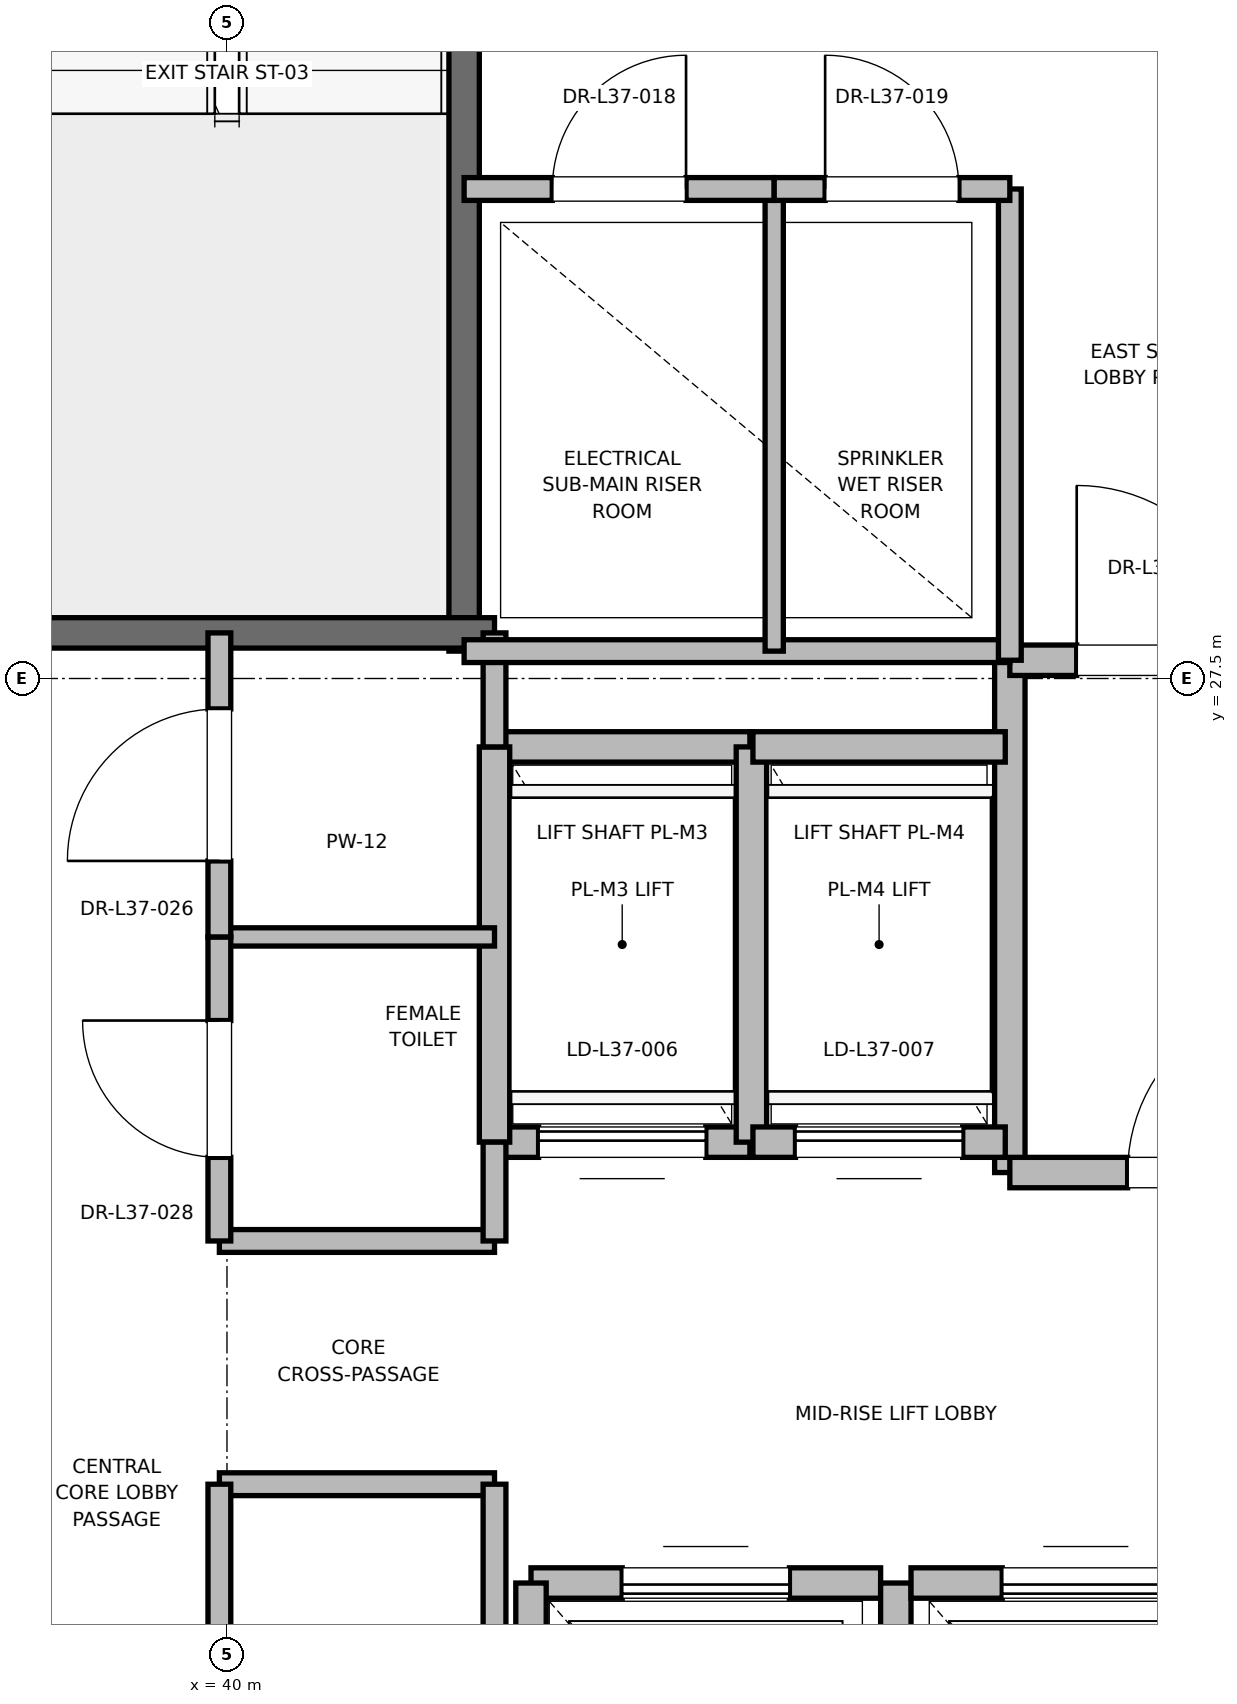
"""IFC4 building model, lengths in metres.
Left out: names, types, materials, properties, quantities, classifications, styles, units other than length and angle.
Written with IfcOpenShell. Run it as: python <this file> out.ifc"""

import sys

from ifc_helpers import new_model, si_unit, direction, frame, frame_2d, origin, place, context, subcontext, project, spatial, rectangle, extrude, element, fill, save


model = new_model("IFC4")
c1 = context("Model", 3, precision=1e-05, world=origin(), true_north=direction((0.0, 1.0)))
c2 = subcontext(c1, "Body", "Model", "MODEL_VIEW")
j1 = project(units=[si_unit("LENGTHUNIT", "METRE"), si_unit("PLANEANGLEUNIT", "RADIAN")], contexts=[c1])
p1 = place(None, origin())
s1 = spatial("IfcSite", under=j1, at=p1, CompositionType="ELEMENT")
p2 = place(p1, origin())
s2 = spatial("IfcBuilding", under=s1, at=p2, CompositionType="ELEMENT")
p3 = place(p2, frame((0.0, 0.0, 160.4)))
s3 = spatial("IfcBuildingStorey", under=s2, at=p3, CompositionType="ELEMENT", Elevation=160.4)
p4 = place(p3, frame((41.56, 27.68, 0.0), z_axis=(0.0, 0.0, 1.0), x_axis=(0.0, 1.0, 0.0)))
e1 = element("IfcWall", 1, at=p4, inside=s3, PredefinedType="SOLIDWALL", context=c2, shape_type="SweptSolid", body=[
    extrude(rectangle(XDim=8.57, YDim=0.2, at=frame_2d((4.285, 0.0))), origin(), (0.0, 0.0, 1.0), 3.775),
])
p5 = place(p3, frame((38.44, 27.8, 0.0), z_axis=(0.0, 0.0, 1.0), x_axis=(1.0, 0.0, 0.0)))
e2 = element("IfcWall", 2, at=p5, inside=s3, PredefinedType="SOLIDWALL", context=c2, shape_type="SweptSolid", body=[
    extrude(rectangle(XDim=3.32, YDim=0.2, at=frame_2d((1.66, 0.0))), origin(), (0.0, 0.0, 1.0), 3.775),
])
p6 = place(p3, frame((45.15, 24.25, 0.0), z_axis=(0.0, 0.0, 1.0), x_axis=(0.0, 1.0, 0.0)))
e3 = element("IfcWall", 3, at=p6, inside=s3, PredefinedType="PARTITIONING", context=c2, shape_type="SweptSolid", body=[
    extrude(rectangle(XDim=3.37, YDim=0.2, at=frame_2d((1.685, 0.0))), origin(), (0.0, 0.0, 1.0), 3.775),
])
p7 = place(p3, frame((45.15, 24.25, 0.0), z_axis=(0.0, 0.0, 1.0), x_axis=(1.0, 0.0, 0.0)))
e4 = element("IfcWall", 4, at=p7, inside=s3, PredefinedType="PARTITIONING", context=c2, shape_type="SweptSolid", body=[
    extrude(rectangle(XDim=2.7, YDim=0.2, at=frame_2d((1.35, 0.0))), origin(), (0.0, 0.0, 1.0), 3.775),
])
p8 = place(p7, frame((0.775, 0.0, 0.0)))
e5 = element("IfcOpeningElement", 5, at=p8, cuts=e4, PredefinedType="OPENING", context=c2, shape_type="SweptSolid", body=[
    extrude(rectangle(XDim=1.15, YDim=2.2, at=frame_2d((0.575, 1.1))), frame((0.0, 0.1, 0.0), z_axis=(0.0, -1.0, 0.0), x_axis=(1.0, 0.0, 0.0)), (0.0, 0.0, 1.0), 0.2),
])
p9 = place(p3, frame((45.15, 27.62, 0.0), z_axis=(0.0, 0.0, 1.0), x_axis=(1.0, 0.0, 0.0)))
e6 = element("IfcWall", 6, at=p9, inside=s3, PredefinedType="PARTITIONING", context=c2, shape_type="SweptSolid", body=[
    extrude(rectangle(XDim=2.03, YDim=0.2, at=frame_2d((1.015, 0.0))), origin(), (0.0, 0.0, 1.0), 3.775),
])
p10 = place(p9, frame((0.44, 0.0, 0.0)))
e7 = element("IfcOpeningElement", 7, at=p10, cuts=e6, PredefinedType="OPENING", context=c2, shape_type="SweptSolid", body=[
    extrude(rectangle(XDim=1.15, YDim=2.2, at=frame_2d((0.575, 1.1))), frame((0.0, 0.1, 0.0), z_axis=(0.0, -1.0, 0.0), x_axis=(1.0, 0.0, 0.0)), (0.0, 0.0, 1.0), 0.2),
])
p11 = place(p3, frame((44.3, 21.55, 0.0), z_axis=(0.0, 0.0, 1.0), x_axis=(-1.0, 0.0, 0.0)))
e8 = element("IfcWall", 8, at=p11, inside=s3, PredefinedType="SOLIDWALL", context=c2, shape_type="SweptSolid", body=[
    extrude(rectangle(XDim=2.3, YDim=0.2, at=frame_2d((1.15, 0.0))), origin(), (0.0, 0.0, 1.0), 3.775),
])
p12 = place(p11, frame((0.6, 0.0, 0.0)))
e9 = element("IfcOpeningElement", 9, at=p12, cuts=e8, PredefinedType="OPENING", context=c2, shape_type="SweptSolid", body=[
    extrude(rectangle(XDim=1.1, YDim=2.2, at=frame_2d((0.55, 1.1))), frame((0.0, 0.1, 0.0), z_axis=(0.0, -1.0, 0.0), x_axis=(1.0, 0.0, 0.0)), (0.0, 0.0, 1.0), 0.2),
])
p13 = place(p3, frame((42.0, 21.55, 0.0), z_axis=(0.0, 0.0, 1.0), x_axis=(0.0, -1.0, 0.0)))
e10 = element("IfcWall", 10, at=p13, inside=s3, PredefinedType="SOLIDWALL", context=c2, shape_type="SweptSolid", body=[
    extrude(rectangle(XDim=2.6, YDim=0.2, at=frame_2d((1.3, 0.0))), origin(), (0.0, 0.0, 1.0), 2.755),
])
p14 = place(p3, frame((44.4, 18.95, 0.0), z_axis=(0.0, 0.0, 1.0), x_axis=(0.0, 1.0, 0.0)))
e11 = element("IfcWall", 11, at=p14, inside=s3, PredefinedType="SOLIDWALL", context=c2, shape_type="SweptSolid", body=[
    extrude(rectangle(XDim=2.6, YDim=0.2, at=frame_2d((1.3, 0.0))), origin(), (0.0, 0.0, 1.0), 3.775),
])
p15 = place(p3, frame((46.8, 21.55, 0.0), z_axis=(0.0, 0.0, 1.0), x_axis=(-1.0, 0.0, 0.0)))
e12 = element("IfcWall", 12, at=p15, inside=s3, PredefinedType="SOLIDWALL", context=c2, shape_type="SweptSolid", body=[
    extrude(rectangle(XDim=2.3, YDim=0.2, at=frame_2d((1.15, 0.0))), origin(), (0.0, 0.0, 1.0), 3.775),
])
p16 = place(p15, frame((0.6, 0.0, 0.0)))
e13 = element("IfcOpeningElement", 13, at=p16, cuts=e12, PredefinedType="OPENING", context=c2, shape_type="SweptSolid", body=[
    extrude(rectangle(XDim=1.1, YDim=2.2, at=frame_2d((0.55, 1.1))), frame((0.0, 0.1, 0.0), z_axis=(0.0, -1.0, 0.0), x_axis=(1.0, 0.0, 0.0)), (0.0, 0.0, 1.0), 0.2),
])
p17 = place(p3, frame((41.76, 24.45, 0.0), z_axis=(0.0, 0.0, 1.0), x_axis=(1.0, 0.0, 0.0)))
e14 = element("IfcWall", 14, at=p17, inside=s3, PredefinedType="SOLIDWALL", context=c2, shape_type="SweptSolid", body=[
    extrude(rectangle(XDim=1.68, YDim=0.2, at=frame_2d((0.84, 0.0))), origin(), (0.0, 0.0, 1.0), 3.775),
])
p18 = place(p17, frame((0.29, 0.0, 0.0)))
e15 = element("IfcOpeningElement", 15, at=p18, cuts=e14, PredefinedType="OPENING", context=c2, shape_type="SweptSolid", body=[
    extrude(rectangle(XDim=1.1, YDim=2.2, at=frame_2d((0.55, 1.1))), frame((0.0, 0.1, 0.0), z_axis=(0.0, -1.0, 0.0), x_axis=(1.0, 0.0, 0.0)), (0.0, 0.0, 1.0), 0.2),
])
p19 = place(p3, frame((43.44, 27.05, 0.0), z_axis=(0.0, 0.0, 1.0), x_axis=(-1.0, 0.0, 0.0)))
e16 = element("IfcWall", 16, at=p19, inside=s3, PredefinedType="SOLIDWALL", context=c2, shape_type="SweptSolid", body=[
    extrude(rectangle(XDim=1.68, YDim=0.2, at=frame_2d((0.84, 0.0))), origin(), (0.0, 0.0, 1.0), 3.775),
])
for number, where, z_axis, x_axis in (
    (17, (41.76, 27.05, 0.0), (0.0, 0.0, 1.0), (0.0, -1.0, 0.0)),
    (18, (43.45, 24.45, 0.0), (0.0, 0.0, 1.0), (0.0, 1.0, 0.0)),
):
    element("IfcWall", number, at=place(p3, frame(where, z_axis=z_axis, x_axis=x_axis)), inside=s3, PredefinedType="SOLIDWALL", context=c2, shape_type="SweptSolid", body=[
        extrude(rectangle(XDim=2.6, YDim=0.2, at=frame_2d((1.3, 0.0))), origin(), (0.0, 0.0, 1.0), 3.775),
    ])
p20 = place(p3, frame((43.46, 24.45, 0.0), z_axis=(0.0, 0.0, 1.0), x_axis=(1.0, 0.0, 0.0)))
e19 = element("IfcWall", 19, at=p20, inside=s3, PredefinedType="SOLIDWALL", context=c2, shape_type="SweptSolid", body=[
    extrude(rectangle(XDim=1.66, YDim=0.2, at=frame_2d((0.83, 0.0))), origin(), (0.0, 0.0, 1.0), 3.775),
])
p21 = place(p20, frame((0.28, 0.0, 0.0)))
e20 = element("IfcOpeningElement", 20, at=p21, cuts=e19, PredefinedType="OPENING", context=c2, shape_type="SweptSolid", body=[
    extrude(rectangle(XDim=1.1, YDim=2.2, at=frame_2d((0.55, 1.1))), frame((0.0, 0.1, 0.0), z_axis=(0.0, -1.0, 0.0), x_axis=(1.0, 0.0, 0.0)), (0.0, 0.0, 1.0), 0.2),
])
p22 = place(p3, frame((45.12, 27.05, 0.0), z_axis=(0.0, 0.0, 1.0), x_axis=(-1.0, 0.0, 0.0)))
e21 = element("IfcWall", 21, at=p22, inside=s3, PredefinedType="SOLIDWALL", context=c2, shape_type="SweptSolid", body=[
    extrude(rectangle(XDim=1.66, YDim=0.2, at=frame_2d((0.83, 0.0))), origin(), (0.0, 0.0, 1.0), 3.775),
])
for number, where, z_axis, x_axis in (
    (22, (39.95, 22.2, 0.0), (0.0, 0.0, 1.0), (1.0, 0.0, 0.0)),
    (23, (39.95, 23.8, 0.0), (0.0, 0.0, 1.0), (1.0, 0.0, 0.0)),
):
    element("IfcWall", number, at=place(p3, frame(where, z_axis=z_axis, x_axis=x_axis)), inside=s3, PredefinedType="PARTITIONING", context=c2, shape_type="SweptSolid", body=[
        extrude(rectangle(XDim=1.81, YDim=0.15, at=frame_2d((0.905, 0.0))), origin(), (0.0, 0.0, 1.0), 2.85),
    ])
p23 = place(p3, frame((39.95, 25.8, 0.0), z_axis=(0.0, 0.0, 1.0), x_axis=(1.0, 0.0, 0.0)))
e24 = element("IfcWall", 24, at=p23, inside=s3, PredefinedType="PARTITIONING", context=c2, shape_type="SweptSolid", body=[
    extrude(rectangle(XDim=1.81, YDim=0.12, at=frame_2d((0.905, 0.0))), origin(), (0.0, 0.0, 1.0), 2.85),
])
p24 = place(p3, frame((41.76, 18.6, 0.0), z_axis=(0.0, 0.0, 1.0), x_axis=(0.0, 1.0, 0.0)))
e25 = element("IfcWall", 25, at=p24, inside=s3, PredefinedType="PARTITIONING", context=c2, shape_type="SweptSolid", body=[
    extrude(rectangle(XDim=3.6, YDim=0.15, at=frame_2d((1.8, 0.0))), origin(), (0.0, 0.0, 1.0), 2.755),
])
p25 = place(p3, frame((41.76, 23.8, 0.0), z_axis=(0.0, 0.0, 1.0), x_axis=(0.0, 1.0, 0.0)))
e26 = element("IfcWall", 26, at=p25, inside=s3, PredefinedType="PARTITIONING", context=c2, shape_type="SweptSolid", body=[
    extrude(rectangle(XDim=0.65, YDim=0.15, at=frame_2d((0.325, 0.0))), origin(), (0.0, 0.0, 1.0), 2.85),
])
p26 = place(p3, frame((41.76, 27.05, 0.0), z_axis=(0.0, 0.0, 1.0), x_axis=(0.0, 1.0, 0.0)))
e27 = element("IfcWall", 27, at=p26, inside=s3, PredefinedType="PARTITIONING", context=c2, shape_type="SweptSolid", body=[
    extrude(rectangle(XDim=0.75, YDim=0.15, at=frame_2d((0.375, 0.0))), origin(), (0.0, 0.0, 1.0), 2.85),
])
p27 = place(p3, frame((39.95, 19.2, 0.0), z_axis=(0.0, 0.0, 1.0), x_axis=(0.0, 1.0, 0.0)))
e28 = element("IfcWall", 28, at=p27, inside=s3, PredefinedType="PARTITIONING", context=c2, shape_type="SweptSolid", body=[
    extrude(rectangle(XDim=3.0, YDim=0.15, at=frame_2d((1.5, 0.0))), origin(), (0.0, 0.0, 1.0), 2.85),
])
p28 = place(p27, frame((1.05, 0.0, 0.0)))
e29 = element("IfcOpeningElement", 29, at=p28, cuts=e28, PredefinedType="OPENING", context=c2, shape_type="SweptSolid", body=[
    extrude(rectangle(XDim=0.9, YDim=2.1, at=frame_2d((0.45, 1.05))), frame((0.0, 0.075, 0.0), z_axis=(0.0, -1.0, 0.0), x_axis=(1.0, 0.0, 0.0)), (0.0, 0.0, 1.0), 0.15),
])
p29 = place(p3, frame((39.95, 23.8, 0.0), z_axis=(0.0, 0.0, 1.0), x_axis=(0.0, 1.0, 0.0)))
e30 = element("IfcWall", 30, at=p29, inside=s3, PredefinedType="PARTITIONING", context=c2, shape_type="SweptSolid", body=[
    extrude(rectangle(XDim=2.0, YDim=0.15, at=frame_2d((1.0, 0.0))), origin(), (0.0, 0.0, 1.0), 2.85),
])
p30 = place(p29, frame((0.55, 0.0, 0.0)))
e31 = element("IfcOpeningElement", 31, at=p30, cuts=e30, PredefinedType="OPENING", context=c2, shape_type="SweptSolid", body=[
    extrude(rectangle(XDim=0.9, YDim=2.1, at=frame_2d((0.45, 1.05))), frame((0.0, 0.075, 0.0), z_axis=(0.0, -1.0, 0.0), x_axis=(1.0, 0.0, 0.0)), (0.0, 0.0, 1.0), 0.15),
])
p31 = place(p3, frame((39.95, 25.8, 0.0), z_axis=(0.0, 0.0, 1.0), x_axis=(0.0, 1.0, 0.0)))
e32 = element("IfcWall", 32, at=p31, inside=s3, PredefinedType="PARTITIONING", context=c2, shape_type="SweptSolid", body=[
    extrude(rectangle(XDim=2.0, YDim=0.15, at=frame_2d((1.0, 0.0))), origin(), (0.0, 0.0, 1.0), 2.85),
])
p32 = place(p31, frame((0.5, 0.0, 0.0)))
e33 = element("IfcOpeningElement", 33, at=p32, cuts=e32, PredefinedType="OPENING", context=c2, shape_type="SweptSolid", body=[
    extrude(rectangle(XDim=1.0, YDim=2.15, at=frame_2d((0.5, 1.075))), frame((0.0, 0.075, 0.0), z_axis=(0.0, -1.0, 0.0), x_axis=(1.0, 0.0, 0.0)), (0.0, 0.0, 1.0), 0.15),
])
p33 = place(p3, frame((41.56, 27.68, 0.0), z_axis=(0.0, 0.0, 1.0), x_axis=(1.0, 0.0, 0.0)))
e34 = element("IfcWall", 34, at=p33, inside=s3, PredefinedType="PARTITIONING", context=c2, shape_type="SweptSolid", body=[
    extrude(rectangle(XDim=3.59, YDim=0.15, at=frame_2d((1.795, 0.0))), origin(), (0.0, 0.0, 1.0), 2.85),
])
p34 = place(p3, frame((45.15, 27.62, 0.0), z_axis=(0.0, 0.0, 1.0), x_axis=(0.0, 1.0, 0.0)))
e35 = element("IfcWall", 35, at=p34, inside=s3, PredefinedType="PARTITIONING", context=c2, shape_type="SweptSolid", body=[
    extrude(rectangle(XDim=3.1, YDim=0.15, at=frame_2d((1.55, 0.0))), origin(), (0.0, 0.0, 1.0), 2.85),
])
p35 = place(p3, frame((43.6, 27.68, 0.0), z_axis=(0.0, 0.0, 1.0), x_axis=(0.0, 1.0, 0.0)))
e36 = element("IfcWall", 36, at=p35, inside=s3, PredefinedType="PARTITIONING", context=c2, shape_type="SweptSolid", body=[
    extrude(rectangle(XDim=3.04, YDim=0.12, at=frame_2d((1.52, 0.0))), origin(), (0.0, 0.0, 1.0), 2.85),
])
p36 = place(p3, frame((41.56, 30.72, 0.0), z_axis=(0.0, 0.0, 1.0), x_axis=(1.0, 0.0, 0.0)))
e37 = element("IfcWall", 37, at=p36, inside=s3, PredefinedType="PARTITIONING", context=c2, shape_type="SweptSolid", body=[
    extrude(rectangle(XDim=2.04, YDim=0.15, at=frame_2d((1.02, 0.0))), origin(), (0.0, 0.0, 1.0), 2.85),
])
p37 = place(p36, frame((0.58, 0.0, 0.0)))
e38 = element("IfcOpeningElement", 38, at=p37, cuts=e37, PredefinedType="OPENING", context=c2, shape_type="SweptSolid", body=[
    extrude(rectangle(XDim=0.88, YDim=2.1, at=frame_2d((0.44, 1.05))), frame((0.0, 0.075, 0.0), z_axis=(0.0, -1.0, 0.0), x_axis=(1.0, 0.0, 0.0)), (0.0, 0.0, 1.0), 0.15),
])
p38 = place(p3, frame((43.6, 30.72, 0.0), z_axis=(0.0, 0.0, 1.0), x_axis=(1.0, 0.0, 0.0)))
e39 = element("IfcWall", 39, at=p38, inside=s3, PredefinedType="PARTITIONING", context=c2, shape_type="SweptSolid", body=[
    extrude(rectangle(XDim=1.55, YDim=0.15, at=frame_2d((0.775, 0.0))), origin(), (0.0, 0.0, 1.0), 2.85),
])
p39 = place(p38, frame((0.335, 0.0, 0.0)))
e40 = element("IfcOpeningElement", 40, at=p39, cuts=e39, PredefinedType="OPENING", context=c2, shape_type="SweptSolid", body=[
    extrude(rectangle(XDim=0.88, YDim=2.1, at=frame_2d((0.44, 1.05))), frame((0.0, 0.075, 0.0), z_axis=(0.0, -1.0, 0.0), x_axis=(1.0, 0.0, 0.0)), (0.0, 0.0, 1.0), 0.15),
])
p40 = place(p8, origin())
e41 = element("IfcDoor", 41, at=p40, inside=s3, OperationType="SINGLE_SWING_RIGHT", PredefinedType="DOOR", context=c2, shape_type="SweptSolid", body=[
    extrude(rectangle(XDim=1.15, YDim=2.2, at=frame_2d((0.575, 1.1))), frame((0.0, 0.025, 0.0), z_axis=(0.0, -1.0, 0.0), x_axis=(1.0, 0.0, 0.0)), (0.0, 0.0, 1.0), 0.05),
])
fill(e5, e41)
p41 = place(p10, origin())
e42 = element("IfcDoor", 42, at=p41, inside=s3, OperationType="SINGLE_SWING_LEFT", PredefinedType="DOOR", context=c2, shape_type="SweptSolid", body=[
    extrude(rectangle(XDim=1.15, YDim=2.2, at=frame_2d((0.575, 1.1))), frame((0.0, 0.025, 0.0), z_axis=(0.0, -1.0, 0.0), x_axis=(1.0, 0.0, 0.0)), (0.0, 0.0, 1.0), 0.05),
])
fill(e7, e42)
p42 = place(p12, origin())
e43 = element("IfcDoor", 43, at=p42, inside=s3, OperationType="SLIDING_TO_RIGHT", PredefinedType="DOOR", context=c2, shape_type="SweptSolid", body=[
    extrude(rectangle(XDim=1.1, YDim=2.2, at=frame_2d((0.55, 1.1))), frame((0.0, 0.025, 0.0), z_axis=(0.0, -1.0, 0.0), x_axis=(1.0, 0.0, 0.0)), (0.0, 0.0, 1.0), 0.05),
])
fill(e9, e43)
p43 = place(p16, origin())
e44 = element("IfcDoor", 44, at=p43, inside=s3, OperationType="SLIDING_TO_RIGHT", PredefinedType="DOOR", context=c2, shape_type="SweptSolid", body=[
    extrude(rectangle(XDim=1.1, YDim=2.2, at=frame_2d((0.55, 1.1))), frame((0.0, 0.025, 0.0), z_axis=(0.0, -1.0, 0.0), x_axis=(1.0, 0.0, 0.0)), (0.0, 0.0, 1.0), 0.05),
])
fill(e13, e44)
p44 = place(p18, origin())
e45 = element("IfcDoor", 45, at=p44, inside=s3, OperationType="SLIDING_TO_RIGHT", PredefinedType="DOOR", context=c2, shape_type="SweptSolid", body=[
    extrude(rectangle(XDim=1.1, YDim=2.2, at=frame_2d((0.55, 1.1))), frame((0.0, 0.025, 0.0), z_axis=(0.0, -1.0, 0.0), x_axis=(1.0, 0.0, 0.0)), (0.0, 0.0, 1.0), 0.05),
])
fill(e15, e45)
p45 = place(p21, origin())
e46 = element("IfcDoor", 46, at=p45, inside=s3, OperationType="SLIDING_TO_RIGHT", PredefinedType="DOOR", context=c2, shape_type="SweptSolid", body=[
    extrude(rectangle(XDim=1.1, YDim=2.2, at=frame_2d((0.55, 1.1))), frame((0.0, 0.025, 0.0), z_axis=(0.0, -1.0, 0.0), x_axis=(1.0, 0.0, 0.0)), (0.0, 0.0, 1.0), 0.05),
])
fill(e20, e46)
p46 = place(p30, origin())
e47 = element("IfcDoor", 47, at=p46, inside=s3, OperationType="SINGLE_SWING_RIGHT", PredefinedType="DOOR", context=c2, shape_type="SweptSolid", body=[
    extrude(rectangle(XDim=0.9, YDim=2.1, at=frame_2d((0.45, 1.05))), frame((0.0, 0.025, 0.0), z_axis=(0.0, -1.0, 0.0), x_axis=(1.0, 0.0, 0.0)), (0.0, 0.0, 1.0), 0.05),
])
fill(e31, e47)
p47 = place(p32, origin())
e48 = element("IfcDoor", 48, at=p47, inside=s3, OperationType="SINGLE_SWING_LEFT", PredefinedType="DOOR", context=c2, shape_type="SweptSolid", body=[
    extrude(rectangle(XDim=1.0, YDim=2.15, at=frame_2d((0.5, 1.075))), frame((0.0, 0.025, 0.0), z_axis=(0.0, -1.0, 0.0), x_axis=(1.0, 0.0, 0.0)), (0.0, 0.0, 1.0), 0.05),
])
fill(e33, e48)
p48 = place(p37, origin())
e49 = element("IfcDoor", 49, at=p48, inside=s3, OperationType="SINGLE_SWING_RIGHT", PredefinedType="DOOR", context=c2, shape_type="SweptSolid", body=[
    extrude(rectangle(XDim=0.88, YDim=2.1, at=frame_2d((0.44, 1.05))), frame((0.0, 0.025, 0.0), z_axis=(0.0, -1.0, 0.0), x_axis=(1.0, 0.0, 0.0)), (0.0, 0.0, 1.0), 0.05),
])
fill(e38, e49)
p49 = place(p39, origin())
e50 = element("IfcDoor", 50, at=p49, inside=s3, OperationType="SINGLE_SWING_LEFT", PredefinedType="DOOR", context=c2, shape_type="SweptSolid", body=[
    extrude(rectangle(XDim=0.88, YDim=2.1, at=frame_2d((0.44, 1.05))), frame((0.0, 0.025, 0.0), z_axis=(0.0, -1.0, 0.0), x_axis=(1.0, 0.0, 0.0)), (0.0, 0.0, 1.0), 0.05),
])
fill(e40, e50)
save(model, sys.argv[1])
